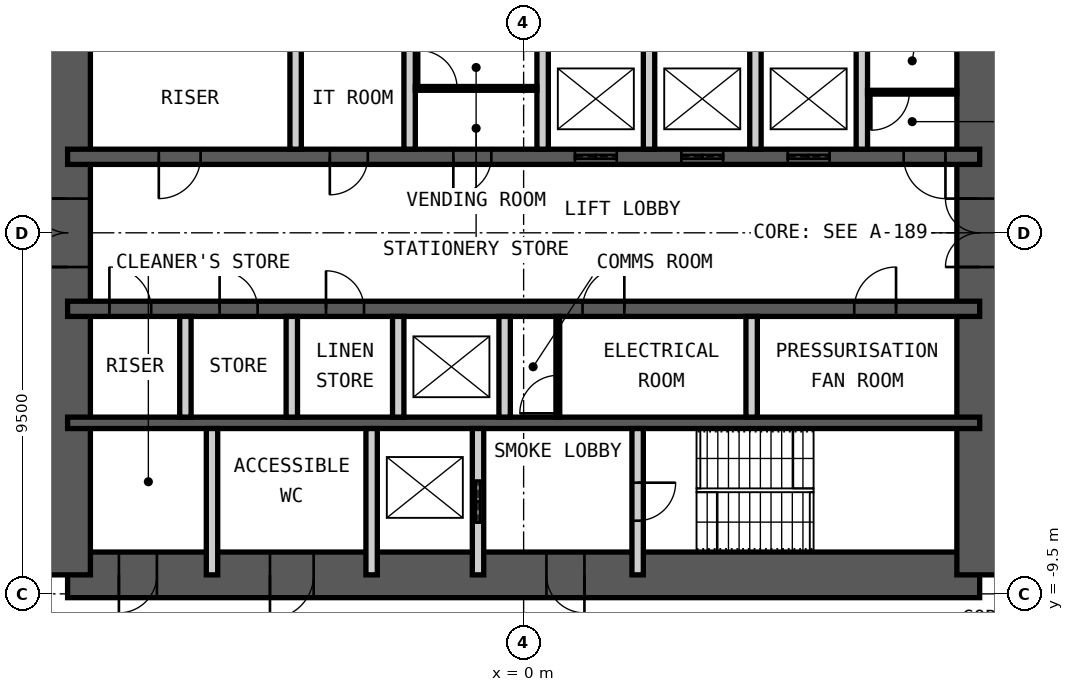
"""IFC4 building model, lengths in metres.
Left out: names, types, materials, properties, quantities, classifications, styles, units other than length and angle.
Written with IfcOpenShell. Run it as: python <this file> out.ifc"""

import sys

from ifc_helpers import new_model, si_unit, direction, frame, frame_2d, origin, place, context, subcontext, project, spatial, rectangle, extrude, element, fill, save


model = new_model("IFC4")
c1 = context("Model", 3, precision=1e-05, world=origin(), true_north=direction((0.0, 1.0)))
c2 = subcontext(c1, "Body", "Model", "MODEL_VIEW")
j1 = project(units=[si_unit("LENGTHUNIT", "METRE"), si_unit("PLANEANGLEUNIT", "RADIAN")], contexts=[c1])
p1 = place(None, origin())
s1 = spatial("IfcSite", under=j1, at=p1, CompositionType="ELEMENT")
p2 = place(p1, origin())
s2 = spatial("IfcBuilding", under=s1, at=p2, CompositionType="ELEMENT")
p3 = place(p2, frame((0.0, 0.0, 243.4)))
s3 = spatial("IfcBuildingStorey", under=s2, at=p3, CompositionType="ELEMENT", Elevation=243.4)
p4 = place(p3, frame((-12.0, -9.0, 0.0), z_axis=(0.0, 0.0, 1.0), x_axis=(1.0, 0.0, 0.0)))
e1 = element("IfcWall", 1, at=p4, inside=s3, PredefinedType="SHEAR", context=c2, shape_type="SweptSolid", body=[
    extrude(rectangle(XDim=24.0, YDim=1.2, at=frame_2d((12.0, 0.0))), origin(), (0.0, 0.0, 1.0), 4.2),
])
p5 = place(p4, frame((1.35, 0.0, 0.0)))
e2 = element("IfcOpeningElement", 2, at=p5, cuts=e1, PredefinedType="OPENING", context=c2, shape_type="SweptSolid", body=[
    extrude(rectangle(XDim=1.0, YDim=2.1, at=frame_2d((0.5, 1.05))), frame((0.0, 0.61, 0.0), z_axis=(0.0, -1.0, 0.0), x_axis=(1.0, 0.0, 0.0)), (0.0, 0.0, 1.0), 1.22),
])
p6 = place(p4, frame((5.325, 0.0, 0.0)))
e3 = element("IfcOpeningElement", 3, at=p6, cuts=e1, PredefinedType="OPENING", context=c2, shape_type="SweptSolid", body=[
    extrude(rectangle(XDim=1.15, YDim=2.1, at=frame_2d((0.575, 1.05))), frame((0.0, 0.61, 0.0), z_axis=(0.0, -1.0, 0.0), x_axis=(1.0, 0.0, 0.0)), (0.0, 0.0, 1.0), 1.22),
])
p7 = place(p4, frame((12.6, 0.0, 0.0)))
e4 = element("IfcOpeningElement", 4, at=p7, cuts=e1, PredefinedType="OPENING", context=c2, shape_type="SweptSolid", body=[
    extrude(rectangle(XDim=1.0, YDim=2.1, at=frame_2d((0.5, 1.05))), frame((0.0, 0.61, 0.0), z_axis=(0.0, -1.0, 0.0), x_axis=(1.0, 0.0, 0.0)), (0.0, 0.0, 1.0), 1.22),
])
p8 = place(p3, frame((12.0, -9.0, 0.0), z_axis=(0.0, 0.0, 1.0), x_axis=(0.0, 1.0, 0.0)))
e5 = element("IfcWall", 5, at=p8, inside=s3, PredefinedType="SHEAR", context=c2, shape_type="SweptSolid", body=[
    extrude(rectangle(XDim=18.0, YDim=1.2, at=frame_2d((9.0, 0.0))), origin(), (0.0, 0.0, 1.0), 4.2),
])
p9 = place(p8, frame((8.1, 0.0, 0.0)))
e6 = element("IfcOpeningElement", 6, at=p9, cuts=e5, PredefinedType="OPENING", context=c2, shape_type="SweptSolid", body=[
    extrude(rectangle(XDim=1.8, YDim=2.1, at=frame_2d((0.9, 1.05))), frame((0.0, 0.61, 0.0), z_axis=(0.0, -1.0, 0.0), x_axis=(1.0, 0.0, 0.0)), (0.0, 0.0, 1.0), 1.22),
])
p10 = place(p3, frame((-12.0, -9.0, 0.0), z_axis=(0.0, 0.0, 1.0), x_axis=(0.0, 1.0, 0.0)))
e7 = element("IfcWall", 7, at=p10, inside=s3, PredefinedType="SHEAR", context=c2, shape_type="SweptSolid", body=[
    extrude(rectangle(XDim=18.0, YDim=1.2, at=frame_2d((9.0, 0.0))), origin(), (0.0, 0.0, 1.0), 4.2),
])
p11 = place(p10, frame((8.1, 0.0, 0.0)))
e8 = element("IfcOpeningElement", 8, at=p11, cuts=e7, PredefinedType="OPENING", context=c2, shape_type="SweptSolid", body=[
    extrude(rectangle(XDim=1.8, YDim=2.1, at=frame_2d((0.9, 1.05))), frame((0.0, 0.61, 0.0), z_axis=(0.0, -1.0, 0.0), x_axis=(1.0, 0.0, 0.0)), (0.0, 0.0, 1.0), 1.22),
])
p12 = place(p3, frame((-12.0, 2.0, 0.0), z_axis=(0.0, 0.0, 1.0), x_axis=(1.0, 0.0, 0.0)))
e9 = element("IfcWall", 9, at=p12, inside=s3, PredefinedType="SHEAR", context=c2, shape_type="SweptSolid", body=[
    extrude(rectangle(XDim=24.0, YDim=0.4, at=frame_2d((12.0, 0.0))), origin(), (0.0, 0.0, 1.0), 4.2),
])
p13 = place(p12, frame((2.4, 0.0, 0.0)))
e10 = element("IfcOpeningElement", 10, at=p13, cuts=e9, PredefinedType="OPENING", context=c2, shape_type="SweptSolid", body=[
    extrude(rectangle(XDim=1.1, YDim=2.1, at=frame_2d((0.55, 1.05))), frame((0.0, 0.21, 0.0), z_axis=(0.0, -1.0, 0.0), x_axis=(1.0, 0.0, 0.0)), (0.0, 0.0, 1.0), 0.42),
])
p14 = place(p12, frame((22.0, 0.0, 0.0)))
e11 = element("IfcOpeningElement", 11, at=p14, cuts=e9, PredefinedType="OPENING", context=c2, shape_type="SweptSolid", body=[
    extrude(rectangle(XDim=1.1, YDim=2.1, at=frame_2d((0.55, 1.05))), frame((0.0, 0.21, 0.0), z_axis=(0.0, -1.0, 0.0), x_axis=(1.0, 0.0, 0.0)), (0.0, 0.0, 1.0), 0.42),
])
p15 = place(p12, frame((10.15, 0.0, 0.0)))
e12 = element("IfcOpeningElement", 12, at=p15, cuts=e9, PredefinedType="OPENING", context=c2, shape_type="SweptSolid", body=[
    extrude(rectangle(XDim=1.0, YDim=2.1, at=frame_2d((0.5, 1.05))), frame((0.0, 0.21, 0.0), z_axis=(0.0, -1.0, 0.0), x_axis=(1.0, 0.0, 0.0)), (0.0, 0.0, 1.0), 0.42),
])
p16 = place(p12, frame((6.9, 0.0, 0.0)))
e13 = element("IfcOpeningElement", 13, at=p16, cuts=e9, PredefinedType="OPENING", context=c2, shape_type="SweptSolid", body=[
    extrude(rectangle(XDim=1.0, YDim=2.1, at=frame_2d((0.5, 1.05))), frame((0.0, 0.21, 0.0), z_axis=(0.0, -1.0, 0.0), x_axis=(1.0, 0.0, 0.0)), (0.0, 0.0, 1.0), 0.42),
])
p17 = place(p12, frame((13.35, 0.0, 0.0)))
e14 = element("IfcOpeningElement", 14, at=p17, cuts=e9, PredefinedType="OPENING", context=c2, shape_type="SweptSolid", body=[
    extrude(rectangle(XDim=1.1, YDim=2.4, at=frame_2d((0.55, 1.2))), frame((0.0, 0.21, 0.0), z_axis=(0.0, -1.0, 0.0), x_axis=(1.0, 0.0, 0.0)), (0.0, 0.0, 1.0), 0.42),
])
p18 = place(p12, frame((16.15, 0.0, 0.0)))
e15 = element("IfcOpeningElement", 15, at=p18, cuts=e9, PredefinedType="OPENING", context=c2, shape_type="SweptSolid", body=[
    extrude(rectangle(XDim=1.1, YDim=2.4, at=frame_2d((0.55, 1.2))), frame((0.0, 0.21, 0.0), z_axis=(0.0, -1.0, 0.0), x_axis=(1.0, 0.0, 0.0)), (0.0, 0.0, 1.0), 0.42),
])
p19 = place(p12, frame((18.95, 0.0, 0.0)))
e16 = element("IfcOpeningElement", 16, at=p19, cuts=e9, PredefinedType="OPENING", context=c2, shape_type="SweptSolid", body=[
    extrude(rectangle(XDim=1.1, YDim=2.4, at=frame_2d((0.55, 1.2))), frame((0.0, 0.21, 0.0), z_axis=(0.0, -1.0, 0.0), x_axis=(1.0, 0.0, 0.0)), (0.0, 0.0, 1.0), 0.42),
])
p20 = place(p3, frame((-12.0, -2.0, 0.0), z_axis=(0.0, 0.0, 1.0), x_axis=(1.0, 0.0, 0.0)))
e17 = element("IfcWall", 17, at=p20, inside=s3, PredefinedType="SHEAR", context=c2, shape_type="SweptSolid", body=[
    extrude(rectangle(XDim=24.0, YDim=0.4, at=frame_2d((12.0, 0.0))), origin(), (0.0, 0.0, 1.0), 4.2),
])
p21 = place(p20, frame((1.1, 0.0, 0.0)))
e18 = element("IfcOpeningElement", 18, at=p21, cuts=e17, PredefinedType="OPENING", context=c2, shape_type="SweptSolid", body=[
    extrude(rectangle(XDim=1.1, YDim=2.1, at=frame_2d((0.55, 1.05))), frame((0.0, 0.21, 0.0), z_axis=(0.0, -1.0, 0.0), x_axis=(1.0, 0.0, 0.0)), (0.0, 0.0, 1.0), 0.42),
])
p22 = place(p20, frame((13.55, 0.0, 0.0)))
e19 = element("IfcOpeningElement", 19, at=p22, cuts=e17, PredefinedType="OPENING", context=c2, shape_type="SweptSolid", body=[
    extrude(rectangle(XDim=1.1, YDim=2.1, at=frame_2d((0.55, 1.05))), frame((0.0, 0.21, 0.0), z_axis=(0.0, -1.0, 0.0), x_axis=(1.0, 0.0, 0.0)), (0.0, 0.0, 1.0), 0.42),
])
p23 = place(p20, frame((20.7, 0.0, 0.0)))
e20 = element("IfcOpeningElement", 20, at=p23, cuts=e17, PredefinedType="OPENING", context=c2, shape_type="SweptSolid", body=[
    extrude(rectangle(XDim=1.1, YDim=2.1, at=frame_2d((0.55, 1.05))), frame((0.0, 0.21, 0.0), z_axis=(0.0, -1.0, 0.0), x_axis=(1.0, 0.0, 0.0)), (0.0, 0.0, 1.0), 0.42),
])
p24 = place(p20, frame((4.0, 0.0, 0.0)))
e21 = element("IfcOpeningElement", 21, at=p24, cuts=e17, PredefinedType="OPENING", context=c2, shape_type="SweptSolid", body=[
    extrude(rectangle(XDim=1.0, YDim=2.1, at=frame_2d((0.5, 1.05))), frame((0.0, 0.21, 0.0), z_axis=(0.0, -1.0, 0.0), x_axis=(1.0, 0.0, 0.0)), (0.0, 0.0, 1.0), 0.42),
])
p25 = place(p20, frame((6.8, 0.0, 0.0)))
e22 = element("IfcOpeningElement", 22, at=p25, cuts=e17, PredefinedType="OPENING", context=c2, shape_type="SweptSolid", body=[
    extrude(rectangle(XDim=1.0, YDim=2.1, at=frame_2d((0.5, 1.05))), frame((0.0, 0.21, 0.0), z_axis=(0.0, -1.0, 0.0), x_axis=(1.0, 0.0, 0.0)), (0.0, 0.0, 1.0), 0.42),
])
p26 = place(p3, frame((-12.0, -5.0, 0.0), z_axis=(0.0, 0.0, 1.0), x_axis=(1.0, 0.0, 0.0)))
e23 = element("IfcWall", 23, at=p26, inside=s3, PredefinedType="SHEAR", context=c2, shape_type="SweptSolid", body=[
    extrude(rectangle(XDim=24.0, YDim=0.3, at=frame_2d((12.0, 0.0))), origin(), (0.0, 0.0, 1.0), 4.2),
])
for number, where, z_axis, x_axis in (
    (24, (-6.0, 2.2, 0.0), (0.0, 0.0, 1.0), (0.0, 1.0, 0.0)),
    (25, (-3.0, 2.2, 0.0), (0.0, 0.0, 1.0), (0.0, 1.0, 0.0)),
    (26, (0.5, 2.2, 0.0), (0.0, 0.0, 1.0), (0.0, 1.0, 0.0)),
    (27, (3.3, 2.2, 0.0), (0.0, 0.0, 1.0), (0.0, 1.0, 0.0)),
    (28, (6.1, 2.2, 0.0), (0.0, 0.0, 1.0), (0.0, 1.0, 0.0)),
    (29, (8.9, 2.2, 0.0), (0.0, 0.0, 1.0), (0.0, 1.0, 0.0)),
    (30, (-8.9, -4.85, 0.0), (0.0, 0.0, 1.0), (0.0, 1.0, 0.0)),
    (31, (-6.1, -4.85, 0.0), (0.0, 0.0, 1.0), (0.0, 1.0, 0.0)),
    (32, (-3.3, -4.85, 0.0), (0.0, 0.0, 1.0), (0.0, 1.0, 0.0)),
    (33, (-0.5, -4.85, 0.0), (0.0, 0.0, 1.0), (0.0, 1.0, 0.0)),
    (34, (6.0, -4.85, 0.0), (0.0, 0.0, 1.0), (0.0, 1.0, 0.0)),
):
    element("IfcWall", number, at=place(p3, frame(where, z_axis=z_axis, x_axis=x_axis)), inside=s3, PredefinedType="PARTITIONING", context=c2, shape_type="SweptSolid", body=[
        extrude(rectangle(XDim=2.65, YDim=0.3, at=frame_2d((1.325, 0.0))), origin(), (0.0, 0.0, 1.0), 3.98),
    ])
for number, where, z_axis, x_axis in (
    (35, (-8.2, -9.0, 0.0), (0.0, 0.0, 1.0), (0.0, 1.0, 0.0)),
    (36, (-4.0, -9.0, 0.0), (0.0, 0.0, 1.0), (0.0, 1.0, 0.0)),
):
    element("IfcWall", number, at=place(p3, frame(where, z_axis=z_axis, x_axis=x_axis)), inside=s3, PredefinedType="PARTITIONING", context=c2, shape_type="SweptSolid", body=[
        extrude(rectangle(XDim=3.85, YDim=0.3, at=frame_2d((1.925, 0.0))), origin(), (0.0, 0.0, 1.0), 3.98),
    ])
p27 = place(p3, frame((-1.2, -9.0, 0.0), z_axis=(0.0, 0.0, 1.0), x_axis=(0.0, 1.0, 0.0)))
e37 = element("IfcWall", 37, at=p27, inside=s3, PredefinedType="PARTITIONING", context=c2, shape_type="SweptSolid", body=[
    extrude(rectangle(XDim=3.85, YDim=0.3, at=frame_2d((1.925, 0.0))), origin(), (0.0, 0.0, 1.0), 3.98),
])
p28 = place(p27, frame((1.375, 0.0, 0.0)))
e38 = element("IfcOpeningElement", 38, at=p28, cuts=e37, PredefinedType="OPENING", context=c2, shape_type="SweptSolid", body=[
    extrude(rectangle(XDim=1.1, YDim=2.4, at=frame_2d((0.55, 1.2))), frame((0.0, 0.16, 0.0), z_axis=(0.0, -1.0, 0.0), x_axis=(1.0, 0.0, 0.0)), (0.0, 0.0, 1.0), 0.32),
])
p29 = place(p3, frame((3.0, -9.0, 0.0), z_axis=(0.0, 0.0, 1.0), x_axis=(0.0, 1.0, 0.0)))
e39 = element("IfcWall", 39, at=p29, inside=s3, PredefinedType="PARTITIONING", context=c2, shape_type="SweptSolid", body=[
    extrude(rectangle(XDim=3.85, YDim=0.3, at=frame_2d((1.925, 0.0))), origin(), (0.0, 0.0, 1.0), 3.98),
])
p30 = place(p29, frame((1.425, 0.0, 0.0)))
e40 = element("IfcOpeningElement", 40, at=p30, cuts=e39, PredefinedType="OPENING", context=c2, shape_type="SweptSolid", body=[
    extrude(rectangle(XDim=1.0, YDim=2.1, at=frame_2d((0.5, 1.05))), frame((0.0, 0.16, 0.0), z_axis=(0.0, -1.0, 0.0), x_axis=(1.0, 0.0, 0.0)), (0.0, 0.0, 1.0), 0.32),
])
p31 = place(p3, frame((-2.85, 3.8, 0.0), z_axis=(0.0, 0.0, 1.0), x_axis=(1.0, 0.0, 0.0)))
e41 = element("IfcWall", 41, at=p31, inside=s3, PredefinedType="PARTITIONING", context=c2, shape_type="SweptSolid", body=[
    extrude(rectangle(XDim=3.2, YDim=0.1, at=frame_2d((1.6, 0.0))), origin(), (0.0, 0.0, 1.0), 3.98),
])
p32 = place(p31, frame((0.1, 0.0, 0.0)))
e42 = element("IfcOpeningElement", 42, at=p32, cuts=e41, PredefinedType="OPENING", context=c2, shape_type="SweptSolid", body=[
    extrude(rectangle(XDim=1.0, YDim=2.4, at=frame_2d((0.5, 1.2))), frame((0.0, 0.06, 0.0), z_axis=(0.0, -1.0, 0.0), x_axis=(1.0, 0.0, 0.0)), (0.0, 0.0, 1.0), 0.12),
])
p33 = place(p3, frame((0.9, -4.85, 0.0), z_axis=(0.0, 0.0, 1.0), x_axis=(0.0, 1.0, 0.0)))
e43 = element("IfcWall", 43, at=p33, inside=s3, PredefinedType="PARTITIONING", context=c2, shape_type="SweptSolid", body=[
    extrude(rectangle(XDim=2.65, YDim=0.1, at=frame_2d((1.325, 0.0))), origin(), (0.0, 0.0, 1.0), 3.98),
])
p34 = place(p33, frame((0.1, 0.0, 0.0)))
e44 = element("IfcOpeningElement", 44, at=p34, cuts=e43, PredefinedType="OPENING", context=c2, shape_type="SweptSolid", body=[
    extrude(rectangle(XDim=1.0, YDim=2.4, at=frame_2d((0.5, 1.2))), frame((0.0, 0.06, 0.0), z_axis=(0.0, -1.0, 0.0), x_axis=(1.0, 0.0, 0.0)), (0.0, 0.0, 1.0), 0.12),
])
p35 = place(p3, frame((9.05, 3.7, 0.0), z_axis=(0.0, 0.0, 1.0), x_axis=(1.0, 0.0, 0.0)))
e45 = element("IfcWall", 45, at=p35, inside=s3, PredefinedType="PARTITIONING", context=c2, shape_type="SweptSolid", body=[
    extrude(rectangle(XDim=2.35, YDim=0.1, at=frame_2d((1.175, 0.0))), origin(), (0.0, 0.0, 1.0), 3.98),
])
p36 = place(p35, frame((0.1, 0.0, 0.0)))
e46 = element("IfcOpeningElement", 46, at=p36, cuts=e45, PredefinedType="OPENING", context=c2, shape_type="SweptSolid", body=[
    extrude(rectangle(XDim=1.0, YDim=2.4, at=frame_2d((0.5, 1.2))), frame((0.0, 0.06, 0.0), z_axis=(0.0, -1.0, 0.0), x_axis=(1.0, 0.0, 0.0)), (0.0, 0.0, 1.0), 0.12),
])
p37 = place(p5, origin())
e47 = element("IfcDoor", 47, at=p37, inside=s3, OperationType="SINGLE_SWING_LEFT", PredefinedType="DOOR", context=c2, shape_type="SweptSolid", body=[
    extrude(rectangle(XDim=1.0, YDim=2.1, at=frame_2d((0.5, 1.05))), frame((0.0, 0.025, 0.0), z_axis=(0.0, -1.0, 0.0), x_axis=(1.0, 0.0, 0.0)), (0.0, 0.0, 1.0), 0.05),
])
fill(e2, e47)
p38 = place(p6, origin())
e48 = element("IfcDoor", 48, at=p38, inside=s3, OperationType="SINGLE_SWING_LEFT", PredefinedType="DOOR", context=c2, shape_type="SweptSolid", body=[
    extrude(rectangle(XDim=1.15, YDim=2.1, at=frame_2d((0.575, 1.05))), frame((0.0, 0.025, 0.0), z_axis=(0.0, -1.0, 0.0), x_axis=(1.0, 0.0, 0.0)), (0.0, 0.0, 1.0), 0.05),
])
fill(e3, e48)
p39 = place(p7, origin())
e49 = element("IfcDoor", 49, at=p39, inside=s3, OperationType="SINGLE_SWING_RIGHT", PredefinedType="DOOR", context=c2, shape_type="SweptSolid", body=[
    extrude(rectangle(XDim=1.0, YDim=2.1, at=frame_2d((0.5, 1.05))), frame((0.0, 0.025, 0.0), z_axis=(0.0, -1.0, 0.0), x_axis=(1.0, 0.0, 0.0)), (0.0, 0.0, 1.0), 0.05),
])
fill(e4, e49)
p40 = place(p30, origin())
e50 = element("IfcDoor", 50, at=p40, inside=s3, OperationType="SINGLE_SWING_RIGHT", PredefinedType="DOOR", context=c2, shape_type="SweptSolid", body=[
    extrude(rectangle(XDim=1.0, YDim=2.1, at=frame_2d((0.5, 1.05))), frame((0.0, 0.025, 0.0), z_axis=(0.0, -1.0, 0.0), x_axis=(1.0, 0.0, 0.0)), (0.0, 0.0, 1.0), 0.05),
])
fill(e40, e50)
p41 = place(p13, origin())
e51 = element("IfcDoor", 51, at=p41, inside=s3, OperationType="SINGLE_SWING_LEFT", PredefinedType="DOOR", context=c2, shape_type="SweptSolid", body=[
    extrude(rectangle(XDim=1.1, YDim=2.1, at=frame_2d((0.55, 1.05))), frame((0.0, 0.025, 0.0), z_axis=(0.0, -1.0, 0.0), x_axis=(1.0, 0.0, 0.0)), (0.0, 0.0, 1.0), 0.05),
])
fill(e10, e51)
p42 = place(p21, origin())
e52 = element("IfcDoor", 52, at=p42, inside=s3, OperationType="SINGLE_SWING_RIGHT", PredefinedType="DOOR", context=c2, shape_type="SweptSolid", body=[
    extrude(rectangle(XDim=1.1, YDim=2.1, at=frame_2d((0.55, 1.05))), frame((0.0, 0.025, 0.0), z_axis=(0.0, -1.0, 0.0), x_axis=(1.0, 0.0, 0.0)), (0.0, 0.0, 1.0), 0.05),
])
fill(e18, e52)
p43 = place(p14, origin())
e53 = element("IfcDoor", 53, at=p43, inside=s3, OperationType="SINGLE_SWING_RIGHT", PredefinedType="DOOR", context=c2, shape_type="SweptSolid", body=[
    extrude(rectangle(XDim=1.1, YDim=2.1, at=frame_2d((0.55, 1.05))), frame((0.0, 0.025, 0.0), z_axis=(0.0, -1.0, 0.0), x_axis=(1.0, 0.0, 0.0)), (0.0, 0.0, 1.0), 0.05),
])
fill(e11, e53)
p44 = place(p15, origin())
e54 = element("IfcDoor", 54, at=p44, inside=s3, OperationType="SINGLE_SWING_LEFT", PredefinedType="DOOR", context=c2, shape_type="SweptSolid", body=[
    extrude(rectangle(XDim=1.0, YDim=2.1, at=frame_2d((0.5, 1.05))), frame((0.0, 0.025, 0.0), z_axis=(0.0, -1.0, 0.0), x_axis=(1.0, 0.0, 0.0)), (0.0, 0.0, 1.0), 0.05),
])
fill(e12, e54)
p45 = place(p22, origin())
e55 = element("IfcDoor", 55, at=p45, inside=s3, OperationType="SINGLE_SWING_LEFT", PredefinedType="DOOR", context=c2, shape_type="SweptSolid", body=[
    extrude(rectangle(XDim=1.1, YDim=2.1, at=frame_2d((0.55, 1.05))), frame((0.0, 0.025, 0.0), z_axis=(0.0, -1.0, 0.0), x_axis=(1.0, 0.0, 0.0)), (0.0, 0.0, 1.0), 0.05),
])
fill(e19, e55)
p46 = place(p23, origin())
e56 = element("IfcDoor", 56, at=p46, inside=s3, OperationType="SINGLE_SWING_LEFT", PredefinedType="DOOR", context=c2, shape_type="SweptSolid", body=[
    extrude(rectangle(XDim=1.1, YDim=2.1, at=frame_2d((0.55, 1.05))), frame((0.0, 0.025, 0.0), z_axis=(0.0, -1.0, 0.0), x_axis=(1.0, 0.0, 0.0)), (0.0, 0.0, 1.0), 0.05),
])
fill(e20, e56)
p47 = place(p9, origin())
e57 = element("IfcDoor", 57, at=p47, inside=s3, OperationType="DOUBLE_DOOR_DOUBLE_SWING", PredefinedType="DOOR", context=c2, shape_type="SweptSolid", body=[
    extrude(rectangle(XDim=1.8, YDim=2.1, at=frame_2d((0.9, 1.05))), frame((0.0, 0.025, 0.0), z_axis=(0.0, -1.0, 0.0), x_axis=(1.0, 0.0, 0.0)), (0.0, 0.0, 1.0), 0.05),
])
fill(e6, e57)
p48 = place(p11, origin())
e58 = element("IfcDoor", 58, at=p48, inside=s3, OperationType="DOUBLE_DOOR_DOUBLE_SWING", PredefinedType="DOOR", context=c2, shape_type="SweptSolid", body=[
    extrude(rectangle(XDim=1.8, YDim=2.1, at=frame_2d((0.9, 1.05))), frame((0.0, 0.025, 0.0), z_axis=(0.0, -1.0, 0.0), x_axis=(1.0, 0.0, 0.0)), (0.0, 0.0, 1.0), 0.05),
])
fill(e8, e58)
p49 = place(p28, origin())
e59 = element("IfcDoor", 59, at=p49, inside=s3, OperationType="DOUBLE_DOOR_SLIDING", PredefinedType="DOOR", context=c2, shape_type="SweptSolid", body=[
    extrude(rectangle(XDim=1.1, YDim=2.4, at=frame_2d((0.55, 1.2))), frame((0.0, 0.025, 0.0), z_axis=(0.0, -1.0, 0.0), x_axis=(1.0, 0.0, 0.0)), (0.0, 0.0, 1.0), 0.05),
])
fill(e38, e59)
p50 = place(p16, origin())
e60 = element("IfcDoor", 60, at=p50, inside=s3, OperationType="SINGLE_SWING_LEFT", PredefinedType="DOOR", context=c2, shape_type="SweptSolid", body=[
    extrude(rectangle(XDim=1.0, YDim=2.1, at=frame_2d((0.5, 1.05))), frame((0.0, 0.025, 0.0), z_axis=(0.0, -1.0, 0.0), x_axis=(1.0, 0.0, 0.0)), (0.0, 0.0, 1.0), 0.05),
])
fill(e13, e60)
p51 = place(p17, origin())
e61 = element("IfcDoor", 61, at=p51, inside=s3, OperationType="DOUBLE_DOOR_SLIDING", PredefinedType="DOOR", context=c2, shape_type="SweptSolid", body=[
    extrude(rectangle(XDim=1.1, YDim=2.4, at=frame_2d((0.55, 1.2))), frame((0.0, 0.025, 0.0), z_axis=(0.0, -1.0, 0.0), x_axis=(1.0, 0.0, 0.0)), (0.0, 0.0, 1.0), 0.05),
])
fill(e14, e61)
p52 = place(p18, origin())
e62 = element("IfcDoor", 62, at=p52, inside=s3, OperationType="DOUBLE_DOOR_SLIDING", PredefinedType="DOOR", context=c2, shape_type="SweptSolid", body=[
    extrude(rectangle(XDim=1.1, YDim=2.4, at=frame_2d((0.55, 1.2))), frame((0.0, 0.025, 0.0), z_axis=(0.0, -1.0, 0.0), x_axis=(1.0, 0.0, 0.0)), (0.0, 0.0, 1.0), 0.05),
])
fill(e15, e62)
p53 = place(p19, origin())
e63 = element("IfcDoor", 63, at=p53, inside=s3, OperationType="DOUBLE_DOOR_SLIDING", PredefinedType="DOOR", context=c2, shape_type="SweptSolid", body=[
    extrude(rectangle(XDim=1.1, YDim=2.4, at=frame_2d((0.55, 1.2))), frame((0.0, 0.025, 0.0), z_axis=(0.0, -1.0, 0.0), x_axis=(1.0, 0.0, 0.0)), (0.0, 0.0, 1.0), 0.05),
])
fill(e16, e63)
p54 = place(p24, origin())
e64 = element("IfcDoor", 64, at=p54, inside=s3, OperationType="SINGLE_SWING_RIGHT", PredefinedType="DOOR", context=c2, shape_type="SweptSolid", body=[
    extrude(rectangle(XDim=1.0, YDim=2.1, at=frame_2d((0.5, 1.05))), frame((0.0, 0.025, 0.0), z_axis=(0.0, -1.0, 0.0), x_axis=(1.0, 0.0, 0.0)), (0.0, 0.0, 1.0), 0.05),
])
fill(e21, e64)
p55 = place(p25, origin())
e65 = element("IfcDoor", 65, at=p55, inside=s3, OperationType="SINGLE_SWING_RIGHT", PredefinedType="DOOR", context=c2, shape_type="SweptSolid", body=[
    extrude(rectangle(XDim=1.0, YDim=2.1, at=frame_2d((0.5, 1.05))), frame((0.0, 0.025, 0.0), z_axis=(0.0, -1.0, 0.0), x_axis=(1.0, 0.0, 0.0)), (0.0, 0.0, 1.0), 0.05),
])
fill(e22, e65)
p56 = place(p32, origin())
e66 = element("IfcDoor", 66, at=p56, inside=s3, OperationType="SINGLE_SWING_RIGHT", PredefinedType="DOOR", context=c2, shape_type="SweptSolid", body=[
    extrude(rectangle(XDim=1.0, YDim=2.4, at=frame_2d((0.5, 1.2))), frame((0.0, 0.025, 0.0), z_axis=(0.0, -1.0, 0.0), x_axis=(1.0, 0.0, 0.0)), (0.0, 0.0, 1.0), 0.05),
])
fill(e42, e66)
p57 = place(p34, origin())
e67 = element("IfcDoor", 67, at=p57, inside=s3, OperationType="SINGLE_SWING_RIGHT", PredefinedType="DOOR", context=c2, shape_type="SweptSolid", body=[
    extrude(rectangle(XDim=1.0, YDim=2.4, at=frame_2d((0.5, 1.2))), frame((0.0, 0.025, 0.0), z_axis=(0.0, -1.0, 0.0), x_axis=(1.0, 0.0, 0.0)), (0.0, 0.0, 1.0), 0.05),
])
fill(e44, e67)
p58 = place(p36, origin())
e68 = element("IfcDoor", 68, at=p58, inside=s3, OperationType="SINGLE_SWING_LEFT", PredefinedType="DOOR", context=c2, shape_type="SweptSolid", body=[
    extrude(rectangle(XDim=1.0, YDim=2.4, at=frame_2d((0.5, 1.2))), frame((0.0, 0.025, 0.0), z_axis=(0.0, -1.0, 0.0), x_axis=(1.0, 0.0, 0.0)), (0.0, 0.0, 1.0), 0.05),
])
fill(e46, e68)
save(model, sys.argv[1])
